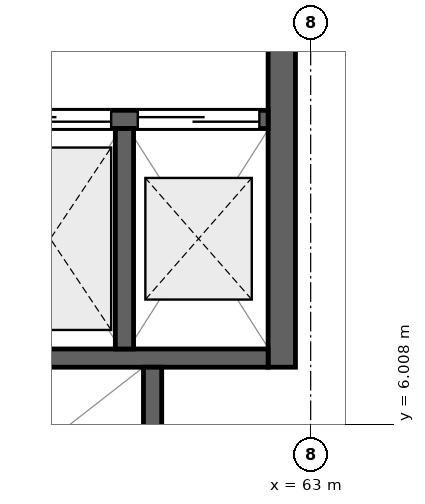
"""IFC4 building model, lengths in metres.
Left out: names, types, materials, properties, quantities, classifications, styles, units other than length and angle.
Written with IfcOpenShell. Run it as: python <this file> out.ifc"""

import sys

from ifc_helpers import new_model, si_unit, direction, frame, frame_2d, origin, place, context, subcontext, project, spatial, rectangle, extrude, element, fill, save


model = new_model("IFC4")
c1 = context("Model", 3, precision=1e-05, world=origin(), true_north=direction((0.0, 1.0)))
c2 = subcontext(c1, "Body", "Model", "MODEL_VIEW")
j1 = project(units=[si_unit("LENGTHUNIT", "METRE"), si_unit("PLANEANGLEUNIT", "RADIAN")], contexts=[c1])
p1 = place(None, origin())
s1 = spatial("IfcSite", under=j1, at=p1, CompositionType="ELEMENT")
p2 = place(p1, origin())
s2 = spatial("IfcBuilding", under=s1, at=p2, CompositionType="ELEMENT")
p3 = place(p2, frame((0.0, 0.0, 5.4)))
s3 = spatial("IfcBuildingStorey", under=s2, at=p3, CompositionType="ELEMENT", Elevation=5.4)
p4 = place(p3, frame((62.62, 6.76, 0.0), z_axis=(0.0, 0.0, 1.0), x_axis=(0.0, 1.0, 0.0)))
e1 = element("IfcWall", 1, at=p4, inside=s3, PredefinedType="SHEAR", context=c2, shape_type="SweptSolid", body=[
    extrude(rectangle(XDim=9.04, YDim=0.36, at=frame_2d((4.52, 0.0))), origin(), (0.0, 0.0, 1.0), 4.16),
])
p5 = place(p3, frame((58.54, 10.02, 0.0), z_axis=(0.0, 0.0, 1.0), x_axis=(1.0, 0.0, 0.0)))
e2 = element("IfcWall", 2, at=p5, inside=s3, PredefinedType="SHEAR", context=c2, shape_type="SweptSolid", body=[
    extrude(rectangle(XDim=3.9, YDim=0.24, at=frame_2d((1.95, 0.0))), origin(), (0.0, 0.0, 1.0), 4.31),
])
p6 = place(p5, frame((0.235, 0.0, 0.0)))
e3 = element("IfcOpeningElement", 3, at=p6, cuts=e2, PredefinedType="OPENING", context=c2, shape_type="SweptSolid", body=[
    extrude(rectangle(XDim=1.6, YDim=2.3, at=frame_2d((0.8, 1.15))), frame((0.0, 0.135, 0.0), z_axis=(0.0, -1.0, 0.0), x_axis=(1.0, 0.0, 0.0)), (0.0, 0.0, 1.0), 0.27),
])
p7 = place(p5, frame((2.185, 0.0, 0.0)))
e4 = element("IfcOpeningElement", 4, at=p7, cuts=e2, PredefinedType="OPENING", context=c2, shape_type="SweptSolid", body=[
    extrude(rectangle(XDim=1.6, YDim=2.3, at=frame_2d((0.8, 1.15))), frame((0.0, 0.135, 0.0), z_axis=(0.0, -1.0, 0.0), x_axis=(1.0, 0.0, 0.0)), (0.0, 0.0, 1.0), 0.27),
])
p8 = place(p3, frame((58.54, 6.88, 0.0), z_axis=(0.0, 0.0, 1.0), x_axis=(1.0, 0.0, 0.0)))
e5 = element("IfcWall", 5, at=p8, inside=s3, PredefinedType="SHEAR", context=c2, shape_type="SweptSolid", body=[
    extrude(rectangle(XDim=3.9, YDim=0.24, at=frame_2d((1.95, 0.0))), origin(), (0.0, 0.0, 1.0), 4.31),
])
p9 = place(p3, frame((60.55, 7.0, 0.0), z_axis=(0.0, 0.0, 1.0), x_axis=(0.0, 1.0, 0.0)))
e6 = element("IfcWall", 6, at=p9, inside=s3, PredefinedType="SHEAR", context=c2, shape_type="SweptSolid", body=[
    extrude(rectangle(XDim=2.9, YDim=0.24, at=frame_2d((1.45, 0.0))), origin(), (0.0, 0.0, 1.0), 4.31),
])
p10 = place(p3, frame((60.92, 4.76, 0.0), z_axis=(0.0, 0.0, 1.0), x_axis=(0.0, 1.0, 0.0)))
e7 = element("IfcWall", 7, at=p10, inside=s3, PredefinedType="SHEAR", context=c2, shape_type="SweptSolid", body=[
    extrude(rectangle(XDim=2.0, YDim=0.24, at=frame_2d((1.0, 0.0))), origin(), (0.0, 0.0, 1.0), 4.31),
])
p11 = place(p6, origin())
e8 = element("IfcDoor", 8, at=p11, inside=s3, OperationType="DOUBLE_DOOR_SLIDING", PredefinedType="DOOR", context=c2, shape_type="SweptSolid", body=[
    extrude(rectangle(XDim=1.6, YDim=2.3, at=frame_2d((0.8, 1.15))), frame((0.0, 0.025, 0.0), z_axis=(0.0, -1.0, 0.0), x_axis=(1.0, 0.0, 0.0)), (0.0, 0.0, 1.0), 0.05),
])
fill(e3, e8)
p12 = place(p7, origin())
e9 = element("IfcDoor", 9, at=p12, inside=s3, OperationType="DOUBLE_DOOR_SLIDING", PredefinedType="DOOR", context=c2, shape_type="SweptSolid", body=[
    extrude(rectangle(XDim=1.6, YDim=2.3, at=frame_2d((0.8, 1.15))), frame((0.0, 0.025, 0.0), z_axis=(0.0, -1.0, 0.0), x_axis=(1.0, 0.0, 0.0)), (0.0, 0.0, 1.0), 0.05),
])
fill(e4, e9)
save(model, sys.argv[1])
